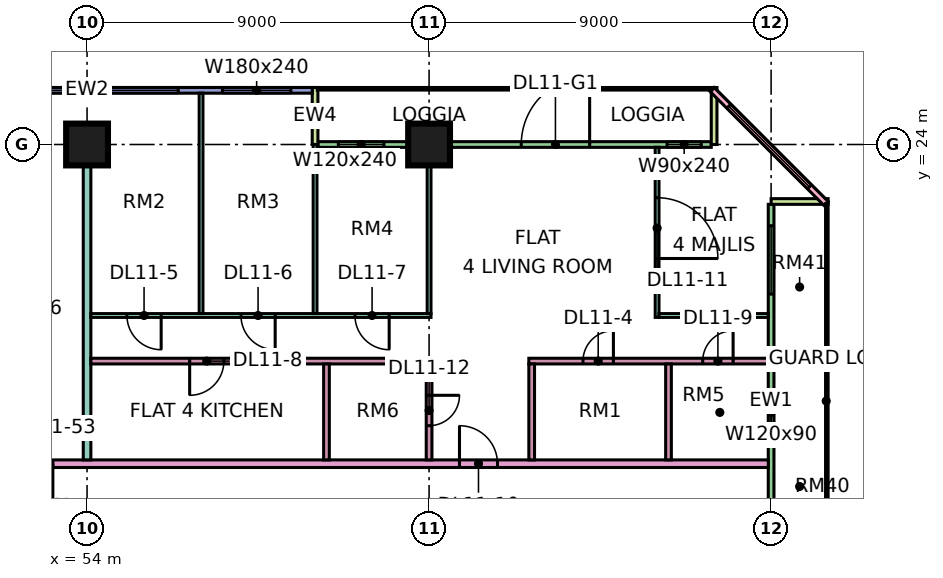
"""IFC4 building model, lengths in metres.
Left out: names, types, materials, properties, quantities, classifications, styles, units other than length and angle.
Written with IfcOpenShell. Run it as: python <this file> out.ifc"""

import sys

from ifc_helpers import new_model, si_unit, direction, frame, frame_2d, origin, origin_2d, place, context, subcontext, project, spatial, rectangle, extrude, element, fill, save


model = new_model("IFC4")
c1 = context("Model", 3, precision=1e-05, world=origin(), true_north=direction((0.0, 1.0)))
c2 = subcontext(c1, "Body", "Model", "MODEL_VIEW")
j1 = project(units=[si_unit("LENGTHUNIT", "METRE"), si_unit("PLANEANGLEUNIT", "RADIAN")], contexts=[c1])
p1 = place(None, origin())
s1 = spatial("IfcSite", under=j1, at=p1, CompositionType="ELEMENT")
p2 = place(p1, origin())
s2 = spatial("IfcBuilding", under=s1, at=p2, CompositionType="ELEMENT")
p3 = place(p2, frame((0.0, 0.0, 56.4)))
s3 = spatial("IfcBuildingStorey", under=s2, at=p3, CompositionType="ELEMENT", Elevation=56.4)
for number, where, z_axis, x_axis in (
    (1, (54.0, 24.0, 0.0), (0.0, 0.0, 1.0), (1.0, 0.0, 0.0)),
    (2, (63.0, 24.0, 0.0), (0.0, 0.0, 1.0), (1.0, 0.0, 0.0)),
):
    element("IfcColumn", number, at=place(p3, frame(where, z_axis=z_axis, x_axis=x_axis)), inside=s3, PredefinedType="COLUMN", context=c2, shape_type="SweptSolid", body=[
        extrude(rectangle(XDim=1.1, YDim=1.1, at=origin_2d()), origin(), (0.0, 0.0, 1.0), 3.75),
    ])
p4 = place(p3, frame((70.425, 24.0, 0.0), z_axis=(0.0, 0.0, 1.0), x_axis=(-1.0, 0.0, 0.0)))
e3 = element("IfcWall", 3, at=p4, inside=s3, PredefinedType="SOLIDWALL", context=c2, shape_type="SweptSolid", body=[
    extrude(rectangle(XDim=10.35, YDim=0.15, at=frame_2d((5.175, 0.0))), origin(), (0.0, 0.0, 1.0), 3.35),
])
p5 = place(p4, frame((0.262, 0.0, 0.45)))
e4 = element("IfcOpeningElement", 4, at=p5, cuts=e3, PredefinedType="OPENING", context=c2, shape_type="SweptSolid", body=[
    extrude(rectangle(XDim=0.9, YDim=2.4, at=frame_2d((0.45, 1.2))), frame((0.0, 0.085, 0.0), z_axis=(0.0, -1.0, 0.0), x_axis=(1.0, 0.0, 0.0)), (0.0, 0.0, 1.0), 0.17),
])
p6 = place(p4, frame((3.2, 0.0, 0.0)))
e5 = element("IfcOpeningElement", 5, at=p6, cuts=e3, PredefinedType="OPENING", context=c2, shape_type="SweptSolid", body=[
    extrude(rectangle(XDim=1.8, YDim=2.4, at=frame_2d((0.9, 1.2))), frame((0.0, 0.085, 0.0), z_axis=(0.0, -1.0, 0.0), x_axis=(1.0, 0.0, 0.0)), (0.0, 0.0, 1.0), 0.17),
])
p7 = place(p4, frame((8.613, 0.0, 0.45)))
e6 = element("IfcOpeningElement", 6, at=p7, cuts=e3, PredefinedType="OPENING", context=c2, shape_type="SweptSolid", body=[
    extrude(rectangle(XDim=1.2, YDim=2.4, at=frame_2d((0.6, 1.2))), frame((0.0, 0.085, 0.0), z_axis=(0.0, -1.0, 0.0), x_axis=(1.0, 0.0, 0.0)), (0.0, 0.0, 1.0), 0.17),
])
for number, where, z_axis, x_axis in (
    (7, (70.5, 25.5, 0.0), (0.0, 0.0, 1.0), (0.0, -1.0, 0.0)),
    (8, (60.0, 25.5, 0.0), (0.0, 0.0, 1.0), (0.0, -1.0, 0.0)),
):
    element("IfcWall", number, at=place(p3, frame(where, z_axis=z_axis, x_axis=x_axis)), inside=s3, PredefinedType="SOLIDWALL", context=c2, shape_type="SweptSolid", body=[
        extrude(rectangle(XDim=1.5, YDim=0.15, at=frame_2d((0.75, 0.0))), origin(), (0.0, 0.0, 1.0), 3.35),
    ])
p8 = place(p3, frame((59.925, 25.425, 0.0), z_axis=(0.0, 0.0, 1.0), x_axis=(-1.0, 0.0, 0.0)))
e9 = element("IfcWall", 9, at=p8, inside=s3, PredefinedType="SOLIDWALL", context=c2, shape_type="SweptSolid", body=[
    extrude(rectangle(XDim=11.85, YDim=0.15, at=frame_2d((5.925, 0.0))), origin(), (0.0, 0.0, 1.0), 3.35),
])
p9 = place(p8, frame((0.562, 0.0, 0.45)))
e10 = element("IfcOpeningElement", 10, at=p9, cuts=e9, PredefinedType="OPENING", context=c2, shape_type="SweptSolid", body=[
    extrude(rectangle(XDim=1.8, YDim=2.4, at=frame_2d((0.9, 1.2))), frame((0.0, 0.085, 0.0), z_axis=(0.0, -1.0, 0.0), x_axis=(1.0, 0.0, 0.0)), (0.0, 0.0, 1.0), 0.17),
])
p10 = place(p8, frame((3.525, 0.0, 0.45)))
e11 = element("IfcOpeningElement", 11, at=p10, cuts=e9, PredefinedType="OPENING", context=c2, shape_type="SweptSolid", body=[
    extrude(rectangle(XDim=1.8, YDim=2.4, at=frame_2d((0.9, 1.2))), frame((0.0, 0.085, 0.0), z_axis=(0.0, -1.0, 0.0), x_axis=(1.0, 0.0, 0.0)), (0.0, 0.0, 1.0), 0.17),
])
p11 = place(p8, frame((6.488, 0.0, 0.45)))
e12 = element("IfcOpeningElement", 12, at=p11, cuts=e9, PredefinedType="OPENING", context=c2, shape_type="SweptSolid", body=[
    extrude(rectangle(XDim=4.8, YDim=2.4, at=frame_2d((2.4, 1.2))), frame((0.0, 0.085, 0.0), z_axis=(0.0, -1.0, 0.0), x_axis=(1.0, 0.0, 0.0)), (0.0, 0.0, 1.0), 0.17),
])
p12 = place(p3, frame((72.0, 12.075, 0.0), z_axis=(0.0, 0.0, 1.0), x_axis=(0.0, 1.0, 0.0)))
e13 = element("IfcWall", 13, at=p12, inside=s3, PredefinedType="SOLIDWALL", context=c2, shape_type="SweptSolid", body=[
    extrude(rectangle(XDim=10.35, YDim=0.15, at=frame_2d((5.175, 0.0))), origin(), (0.0, 0.0, 1.0), 3.35),
])
p13 = place(p12, frame((4.275, 0.0, 1.7)))
e14 = element("IfcOpeningElement", 14, at=p13, cuts=e13, PredefinedType="OPENING", context=c2, shape_type="SweptSolid", body=[
    extrude(rectangle(XDim=1.2, YDim=0.9, at=frame_2d((0.6, 0.45))), frame((0.0, 0.085, 0.0), z_axis=(0.0, -1.0, 0.0), x_axis=(1.0, 0.0, 0.0)), (0.0, 0.0, 1.0), 0.17),
])
p14 = place(p12, frame((7.988, 0.0, 0.45)))
e15 = element("IfcOpeningElement", 15, at=p14, cuts=e13, PredefinedType="OPENING", context=c2, shape_type="SweptSolid", body=[
    extrude(rectangle(XDim=1.8, YDim=2.4, at=frame_2d((0.9, 1.2))), frame((0.0, 0.085, 0.0), z_axis=(0.0, -1.0, 0.0), x_axis=(1.0, 0.0, 0.0)), (0.0, 0.0, 1.0), 0.17),
])
p15 = place(p3, frame((73.5, 22.5, 0.0), z_axis=(0.0, 0.0, 1.0), x_axis=(-1.0, 0.0, 0.0)))
e16 = element("IfcWall", 16, at=p15, inside=s3, PredefinedType="SOLIDWALL", context=c2, shape_type="SweptSolid", body=[
    extrude(rectangle(XDim=1.5, YDim=0.15, at=frame_2d((0.75, 0.0))), origin(), (0.0, 0.0, 1.0), 3.35),
])
p16 = place(p3, frame((73.447, 22.447, 0.0), z_axis=(0.0, 0.0, 1.0), x_axis=(-0.707106781187, 0.707106781187, 0.0)))
e17 = element("IfcWall", 17, at=p16, inside=s3, PredefinedType="SOLIDWALL", context=c2, shape_type="SweptSolid", body=[
    extrude(rectangle(XDim=4.243, YDim=0.15, at=frame_2d((2.121, 0.0))), origin(), (0.0, 0.0, 1.0), 3.35),
])
p17 = place(p16, frame((0.621, 0.0, 0.45)))
e18 = element("IfcOpeningElement", 18, at=p17, cuts=e17, PredefinedType="OPENING", context=c2, shape_type="SweptSolid", body=[
    extrude(rectangle(XDim=3.0, YDim=2.4, at=frame_2d((1.5, 1.2))), frame((0.0, 0.085, 0.0), z_axis=(0.0, -1.0, 0.0), x_axis=(1.0, 0.0, 0.0)), (0.0, 0.0, 1.0), 0.17),
])
p18 = place(p3, frame((51.225, 15.6, 0.0), z_axis=(0.0, 0.0, 1.0), x_axis=(1.0, 0.0, 0.0)))
e19 = element("IfcWall", 19, at=p18, inside=s3, PredefinedType="PARTITIONING", context=c2, shape_type="SweptSolid", body=[
    extrude(rectangle(XDim=20.701, YDim=0.2, at=frame_2d((10.351, 0.0))), origin(), (0.0, 0.0, 1.0), 3.35),
])
p19 = place(p18, frame((12.575, 0.0, 0.0)))
e20 = element("IfcOpeningElement", 20, at=p19, cuts=e19, PredefinedType="OPENING", context=c2, shape_type="SweptSolid", body=[
    extrude(rectangle(XDim=1.0, YDim=2.1, at=frame_2d((0.5, 1.05))), frame((0.0, 0.11, 0.0), z_axis=(0.0, -1.0, 0.0), x_axis=(1.0, 0.0, 0.0)), (0.0, 0.0, 1.0), 0.22),
])
p20 = place(p18, frame((0.875, 0.0, 0.0)))
e21 = element("IfcOpeningElement", 21, at=p20, cuts=e19, PredefinedType="OPENING", context=c2, shape_type="SweptSolid", body=[
    extrude(rectangle(XDim=1.0, YDim=2.1, at=frame_2d((0.5, 1.05))), frame((0.0, 0.11, 0.0), z_axis=(0.0, -1.0, 0.0), x_axis=(1.0, 0.0, 0.0)), (0.0, 0.0, 1.0), 0.22),
])
p21 = place(p3, frame((54.0, 15.7, 0.0), z_axis=(0.0, 0.0, 1.0), x_axis=(0.0, 1.0, 0.0)))
e22 = element("IfcWall", 22, at=p21, inside=s3, PredefinedType="PARTITIONING", context=c2, shape_type="SweptSolid", body=[
    extrude(rectangle(XDim=8.3, YDim=0.2, at=frame_2d((4.15, 0.0))), origin(), (0.0, 0.0, 1.0), 3.35),
])
p22 = place(p3, frame((54.1, 18.3, 0.0), z_axis=(0.0, 0.0, 1.0), x_axis=(1.0, 0.0, 0.0)))
e23 = element("IfcWall", 23, at=p22, inside=s3, PredefinedType="PARTITIONING", context=c2, shape_type="SweptSolid", body=[
    extrude(rectangle(XDim=8.975, YDim=0.15, at=frame_2d((4.487, 0.0))), origin(), (0.0, 0.0, 1.0), 3.35),
])
p23 = place(p22, frame((2.6, 0.0, 0.0)))
e24 = element("IfcOpeningElement", 24, at=p23, cuts=e23, PredefinedType="OPENING", context=c2, shape_type="SweptSolid", body=[
    extrude(rectangle(XDim=0.9, YDim=2.1, at=frame_2d((0.45, 1.05))), frame((0.0, 0.085, 0.0), z_axis=(0.0, -1.0, 0.0), x_axis=(1.0, 0.0, 0.0)), (0.0, 0.0, 1.0), 0.17),
])
p24 = place(p3, frame((54.1, 19.5, 0.0), z_axis=(0.0, 0.0, 1.0), x_axis=(1.0, 0.0, 0.0)))
e25 = element("IfcWall", 25, at=p24, inside=s3, PredefinedType="PARTITIONING", context=c2, shape_type="SweptSolid", body=[
    extrude(rectangle(XDim=8.95, YDim=0.1, at=frame_2d((4.475, 0.0))), origin(), (0.0, 0.0, 1.0), 3.35),
])
p25 = place(p24, frame((0.95, 0.0, 0.0)))
e26 = element("IfcOpeningElement", 26, at=p25, cuts=e25, PredefinedType="OPENING", context=c2, shape_type="SweptSolid", body=[
    extrude(rectangle(XDim=0.9, YDim=2.1, at=frame_2d((0.45, 1.05))), frame((0.0, 0.06, 0.0), z_axis=(0.0, -1.0, 0.0), x_axis=(1.0, 0.0, 0.0)), (0.0, 0.0, 1.0), 0.12),
])
p26 = place(p24, frame((3.95, 0.0, 0.0)))
e27 = element("IfcOpeningElement", 27, at=p26, cuts=e25, PredefinedType="OPENING", context=c2, shape_type="SweptSolid", body=[
    extrude(rectangle(XDim=0.9, YDim=2.1, at=frame_2d((0.45, 1.05))), frame((0.0, 0.06, 0.0), z_axis=(0.0, -1.0, 0.0), x_axis=(1.0, 0.0, 0.0)), (0.0, 0.0, 1.0), 0.12),
])
p27 = place(p24, frame((6.95, 0.0, 0.0)))
e28 = element("IfcOpeningElement", 28, at=p27, cuts=e25, PredefinedType="OPENING", context=c2, shape_type="SweptSolid", body=[
    extrude(rectangle(XDim=0.9, YDim=2.1, at=frame_2d((0.45, 1.05))), frame((0.0, 0.06, 0.0), z_axis=(0.0, -1.0, 0.0), x_axis=(1.0, 0.0, 0.0)), (0.0, 0.0, 1.0), 0.12),
])
p28 = place(p3, frame((57.0, 19.55, 0.0), z_axis=(0.0, 0.0, 1.0), x_axis=(0.0, 1.0, 0.0)))
e29 = element("IfcWall", 29, at=p28, inside=s3, PredefinedType="PARTITIONING", context=c2, shape_type="SweptSolid", body=[
    extrude(rectangle(XDim=5.801, YDim=0.1, at=frame_2d((2.9, 0.0))), origin(), (0.0, 0.0, 1.0), 3.35),
])
p29 = place(p3, frame((60.0, 19.55, 0.0), z_axis=(0.0, 0.0, 1.0), x_axis=(0.0, 1.0, 0.0)))
e30 = element("IfcWall", 30, at=p29, inside=s3, PredefinedType="PARTITIONING", context=c2, shape_type="SweptSolid", body=[
    extrude(rectangle(XDim=4.45, YDim=0.1, at=frame_2d((2.225, 0.0))), origin(), (0.0, 0.0, 1.0), 3.35),
])
p30 = place(p3, frame((60.3, 15.7, 0.0), z_axis=(0.0, 0.0, 1.0), x_axis=(0.0, 1.0, 0.0)))
e31 = element("IfcWall", 31, at=p30, inside=s3, PredefinedType="PARTITIONING", context=c2, shape_type="SweptSolid", body=[
    extrude(rectangle(XDim=2.525, YDim=0.15, at=frame_2d((1.263, 0.0))), origin(), (0.0, 0.0, 1.0), 3.35),
])
p31 = place(p3, frame((63.0, 15.7, 0.0), z_axis=(0.0, 0.0, 1.0), x_axis=(0.0, 1.0, 0.0)))
e32 = element("IfcWall", 32, at=p31, inside=s3, PredefinedType="PARTITIONING", context=c2, shape_type="SweptSolid", body=[
    extrude(rectangle(XDim=2.525, YDim=0.15, at=frame_2d((1.263, 0.0))), origin(), (0.0, 0.0, 1.0), 3.35),
])
p32 = place(p31, frame((0.9, 0.0, 0.0)))
e33 = element("IfcOpeningElement", 33, at=p32, cuts=e32, PredefinedType="OPENING", context=c2, shape_type="SweptSolid", body=[
    extrude(rectangle(XDim=0.8, YDim=2.1, at=frame_2d((0.4, 1.05))), frame((0.0, 0.085, 0.0), z_axis=(0.0, -1.0, 0.0), x_axis=(1.0, 0.0, 0.0)), (0.0, 0.0, 1.0), 0.17),
])
p33 = place(p3, frame((63.0, 19.55, 0.0), z_axis=(0.0, 0.0, 1.0), x_axis=(0.0, 1.0, 0.0)))
e34 = element("IfcWall", 34, at=p33, inside=s3, PredefinedType="PARTITIONING", context=c2, shape_type="SweptSolid", body=[
    extrude(rectangle(XDim=4.376, YDim=0.1, at=frame_2d((2.188, 0.0))), origin(), (0.0, 0.0, 1.0), 3.35),
])
p34 = place(p3, frame((65.625, 18.3, 0.0), z_axis=(0.0, 0.0, 1.0), x_axis=(1.0, 0.0, 0.0)))
e35 = element("IfcWall", 35, at=p34, inside=s3, PredefinedType="PARTITIONING", context=c2, shape_type="SweptSolid", body=[
    extrude(rectangle(XDim=6.301, YDim=0.15, at=frame_2d((3.15, 0.0))), origin(), (0.0, 0.0, 1.0), 3.35),
])
p35 = place(p34, frame((1.425, 0.0, 0.0)))
e36 = element("IfcOpeningElement", 36, at=p35, cuts=e35, PredefinedType="OPENING", context=c2, shape_type="SweptSolid", body=[
    extrude(rectangle(XDim=0.8, YDim=2.1, at=frame_2d((0.4, 1.05))), frame((0.0, 0.085, 0.0), z_axis=(0.0, -1.0, 0.0), x_axis=(1.0, 0.0, 0.0)), (0.0, 0.0, 1.0), 0.17),
])
p36 = place(p34, frame((4.575, 0.0, 0.0)))
e37 = element("IfcOpeningElement", 37, at=p36, cuts=e35, PredefinedType="OPENING", context=c2, shape_type="SweptSolid", body=[
    extrude(rectangle(XDim=0.8, YDim=2.1, at=frame_2d((0.4, 1.05))), frame((0.0, 0.085, 0.0), z_axis=(0.0, -1.0, 0.0), x_axis=(1.0, 0.0, 0.0)), (0.0, 0.0, 1.0), 0.17),
])
p37 = place(p3, frame((65.7, 15.7, 0.0), z_axis=(0.0, 0.0, 1.0), x_axis=(0.0, 1.0, 0.0)))
e38 = element("IfcWall", 38, at=p37, inside=s3, PredefinedType="PARTITIONING", context=c2, shape_type="SweptSolid", body=[
    extrude(rectangle(XDim=2.525, YDim=0.15, at=frame_2d((1.263, 0.0))), origin(), (0.0, 0.0, 1.0), 3.35),
])
p38 = place(p3, frame((69.0, 19.45, 0.0), z_axis=(0.0, 0.0, 1.0), x_axis=(0.0, 1.0, 0.0)))
e39 = element("IfcWall", 39, at=p38, inside=s3, PredefinedType="PARTITIONING", context=c2, shape_type="SweptSolid", body=[
    extrude(rectangle(XDim=4.476, YDim=0.1, at=frame_2d((2.238, 0.0))), origin(), (0.0, 0.0, 1.0), 3.35),
])
p39 = place(p38, frame((1.55, 0.0, 0.0)))
e40 = element("IfcOpeningElement", 40, at=p39, cuts=e39, PredefinedType="OPENING", context=c2, shape_type="SweptSolid", body=[
    extrude(rectangle(XDim=1.6, YDim=2.1, at=frame_2d((0.8, 1.05))), frame((0.0, 0.06, 0.0), z_axis=(0.0, -1.0, 0.0), x_axis=(1.0, 0.0, 0.0)), (0.0, 0.0, 1.0), 0.12),
])
p40 = place(p3, frame((69.05, 19.5, 0.0), z_axis=(0.0, 0.0, 1.0), x_axis=(1.0, 0.0, 0.0)))
e41 = element("IfcWall", 41, at=p40, inside=s3, PredefinedType="PARTITIONING", context=c2, shape_type="SweptSolid", body=[
    extrude(rectangle(XDim=2.876, YDim=0.1, at=frame_2d((1.438, 0.0))), origin(), (0.0, 0.0, 1.0), 3.35),
])
p41 = place(p3, frame((69.3, 15.7, 0.0), z_axis=(0.0, 0.0, 1.0), x_axis=(0.0, 1.0, 0.0)))
e42 = element("IfcWall", 42, at=p41, inside=s3, PredefinedType="PARTITIONING", context=c2, shape_type="SweptSolid", body=[
    extrude(rectangle(XDim=2.525, YDim=0.15, at=frame_2d((1.263, 0.0))), origin(), (0.0, 0.0, 1.0), 3.35),
])
p42 = place(p5, origin())
e43 = element("IfcWindow", 43, at=p42, inside=s3, PartitioningType="SINGLE_PANEL", PredefinedType="WINDOW", context=c2, shape_type="SweptSolid", body=[
    extrude(rectangle(XDim=0.9, YDim=2.4, at=frame_2d((0.45, 1.2))), frame((0.0, 0.03, 0.0), z_axis=(0.0, -1.0, 0.0), x_axis=(1.0, 0.0, 0.0)), (0.0, 0.0, 1.0), 0.06),
])
fill(e4, e43)
p43 = place(p6, frame((1.8, 0.0, 0.0), z_axis=(0.0, 0.0, 1.0), x_axis=(-1.0, 0.0, 0.0)))
e44 = element("IfcDoor", 44, at=p43, inside=s3, OperationType="DOUBLE_DOOR_SINGLE_SWING", PredefinedType="DOOR", context=c2, shape_type="SweptSolid", body=[
    extrude(rectangle(XDim=1.8, YDim=2.4, at=frame_2d((0.9, 1.2))), frame((0.0, 0.025, 0.0), z_axis=(0.0, -1.0, 0.0), x_axis=(1.0, 0.0, 0.0)), (0.0, 0.0, 1.0), 0.05),
])
fill(e5, e44)
p44 = place(p7, origin())
e45 = element("IfcWindow", 45, at=p44, inside=s3, PartitioningType="SINGLE_PANEL", PredefinedType="WINDOW", context=c2, shape_type="SweptSolid", body=[
    extrude(rectangle(XDim=1.2, YDim=2.4, at=frame_2d((0.6, 1.2))), frame((0.0, 0.03, 0.0), z_axis=(0.0, -1.0, 0.0), x_axis=(1.0, 0.0, 0.0)), (0.0, 0.0, 1.0), 0.06),
])
fill(e6, e45)
p45 = place(p9, origin())
e46 = element("IfcWindow", 46, at=p45, inside=s3, PartitioningType="SINGLE_PANEL", PredefinedType="WINDOW", context=c2, shape_type="SweptSolid", body=[
    extrude(rectangle(XDim=1.8, YDim=2.4, at=frame_2d((0.9, 1.2))), frame((0.0, 0.03, 0.0), z_axis=(0.0, -1.0, 0.0), x_axis=(1.0, 0.0, 0.0)), (0.0, 0.0, 1.0), 0.06),
])
fill(e10, e46)
p46 = place(p10, origin())
e47 = element("IfcWindow", 47, at=p46, inside=s3, PartitioningType="SINGLE_PANEL", PredefinedType="WINDOW", context=c2, shape_type="SweptSolid", body=[
    extrude(rectangle(XDim=1.8, YDim=2.4, at=frame_2d((0.9, 1.2))), frame((0.0, 0.03, 0.0), z_axis=(0.0, -1.0, 0.0), x_axis=(1.0, 0.0, 0.0)), (0.0, 0.0, 1.0), 0.06),
])
fill(e11, e47)
p47 = place(p11, origin())
e48 = element("IfcWindow", 48, at=p47, inside=s3, PartitioningType="SINGLE_PANEL", PredefinedType="WINDOW", context=c2, shape_type="SweptSolid", body=[
    extrude(rectangle(XDim=4.8, YDim=2.4, at=frame_2d((2.4, 1.2))), frame((0.0, 0.03, 0.0), z_axis=(0.0, -1.0, 0.0), x_axis=(1.0, 0.0, 0.0)), (0.0, 0.0, 1.0), 0.06),
])
fill(e12, e48)
p48 = place(p13, origin())
e49 = element("IfcWindow", 49, at=p48, inside=s3, PartitioningType="SINGLE_PANEL", PredefinedType="WINDOW", context=c2, shape_type="SweptSolid", body=[
    extrude(rectangle(XDim=1.2, YDim=0.9, at=frame_2d((0.6, 0.45))), frame((0.0, 0.03, 0.0), z_axis=(0.0, -1.0, 0.0), x_axis=(1.0, 0.0, 0.0)), (0.0, 0.0, 1.0), 0.06),
])
fill(e14, e49)
p49 = place(p14, origin())
e50 = element("IfcWindow", 50, at=p49, inside=s3, PartitioningType="SINGLE_PANEL", PredefinedType="WINDOW", context=c2, shape_type="SweptSolid", body=[
    extrude(rectangle(XDim=1.8, YDim=2.4, at=frame_2d((0.9, 1.2))), frame((0.0, 0.03, 0.0), z_axis=(0.0, -1.0, 0.0), x_axis=(1.0, 0.0, 0.0)), (0.0, 0.0, 1.0), 0.06),
])
fill(e15, e50)
p50 = place(p17, origin())
e51 = element("IfcWindow", 51, at=p50, inside=s3, PartitioningType="SINGLE_PANEL", PredefinedType="WINDOW", context=c2, shape_type="SweptSolid", body=[
    extrude(rectangle(XDim=3.0, YDim=2.4, at=frame_2d((1.5, 1.2))), frame((0.0, 0.03, 0.0), z_axis=(0.0, -1.0, 0.0), x_axis=(1.0, 0.0, 0.0)), (0.0, 0.0, 1.0), 0.06),
])
fill(e18, e51)
p51 = place(p35, frame((0.8, 0.0, 0.0), z_axis=(0.0, 0.0, 1.0), x_axis=(-1.0, 0.0, 0.0)))
e52 = element("IfcDoor", 52, at=p51, inside=s3, OperationType="SINGLE_SWING_RIGHT", PredefinedType="DOOR", context=c2, shape_type="SweptSolid", body=[
    extrude(rectangle(XDim=0.8, YDim=2.1, at=frame_2d((0.4, 1.05))), frame((0.0, 0.025, 0.0), z_axis=(0.0, -1.0, 0.0), x_axis=(1.0, 0.0, 0.0)), (0.0, 0.0, 1.0), 0.05),
])
fill(e36, e52)
p52 = place(p25, origin())
e53 = element("IfcDoor", 53, at=p52, inside=s3, OperationType="SINGLE_SWING_RIGHT", PredefinedType="DOOR", context=c2, shape_type="SweptSolid", body=[
    extrude(rectangle(XDim=0.9, YDim=2.1, at=frame_2d((0.45, 1.05))), frame((0.0, 0.025, 0.0), z_axis=(0.0, -1.0, 0.0), x_axis=(1.0, 0.0, 0.0)), (0.0, 0.0, 1.0), 0.05),
])
fill(e26, e53)
p53 = place(p26, origin())
e54 = element("IfcDoor", 54, at=p53, inside=s3, OperationType="SINGLE_SWING_RIGHT", PredefinedType="DOOR", context=c2, shape_type="SweptSolid", body=[
    extrude(rectangle(XDim=0.9, YDim=2.1, at=frame_2d((0.45, 1.05))), frame((0.0, 0.025, 0.0), z_axis=(0.0, -1.0, 0.0), x_axis=(1.0, 0.0, 0.0)), (0.0, 0.0, 1.0), 0.05),
])
fill(e27, e54)
p54 = place(p27, origin())
e55 = element("IfcDoor", 55, at=p54, inside=s3, OperationType="SINGLE_SWING_RIGHT", PredefinedType="DOOR", context=c2, shape_type="SweptSolid", body=[
    extrude(rectangle(XDim=0.9, YDim=2.1, at=frame_2d((0.45, 1.05))), frame((0.0, 0.025, 0.0), z_axis=(0.0, -1.0, 0.0), x_axis=(1.0, 0.0, 0.0)), (0.0, 0.0, 1.0), 0.05),
])
fill(e28, e55)
p55 = place(p23, frame((0.9, 0.0, 0.0), z_axis=(0.0, 0.0, 1.0), x_axis=(-1.0, 0.0, 0.0)))
e56 = element("IfcDoor", 56, at=p55, inside=s3, OperationType="SINGLE_SWING_LEFT", PredefinedType="DOOR", context=c2, shape_type="SweptSolid", body=[
    extrude(rectangle(XDim=0.9, YDim=2.1, at=frame_2d((0.45, 1.05))), frame((0.0, 0.025, 0.0), z_axis=(0.0, -1.0, 0.0), x_axis=(1.0, 0.0, 0.0)), (0.0, 0.0, 1.0), 0.05),
])
fill(e24, e56)
p56 = place(p36, frame((0.8, 0.0, 0.0), z_axis=(0.0, 0.0, 1.0), x_axis=(-1.0, 0.0, 0.0)))
e57 = element("IfcDoor", 57, at=p56, inside=s3, OperationType="SINGLE_SWING_RIGHT", PredefinedType="DOOR", context=c2, shape_type="SweptSolid", body=[
    extrude(rectangle(XDim=0.8, YDim=2.1, at=frame_2d((0.4, 1.05))), frame((0.0, 0.025, 0.0), z_axis=(0.0, -1.0, 0.0), x_axis=(1.0, 0.0, 0.0)), (0.0, 0.0, 1.0), 0.05),
])
fill(e37, e57)
p57 = place(p19, origin())
e58 = element("IfcDoor", 58, at=p57, inside=s3, OperationType="SINGLE_SWING_LEFT", PredefinedType="DOOR", context=c2, shape_type="SweptSolid", body=[
    extrude(rectangle(XDim=1.0, YDim=2.1, at=frame_2d((0.5, 1.05))), frame((0.0, 0.025, 0.0), z_axis=(0.0, -1.0, 0.0), x_axis=(1.0, 0.0, 0.0)), (0.0, 0.0, 1.0), 0.05),
])
fill(e20, e58)
p58 = place(p39, frame((1.6, 0.0, 0.0), z_axis=(0.0, 0.0, 1.0), x_axis=(-1.0, 0.0, 0.0)))
e59 = element("IfcDoor", 59, at=p58, inside=s3, OperationType="DOUBLE_DOOR_SINGLE_SWING", PredefinedType="DOOR", context=c2, shape_type="SweptSolid", body=[
    extrude(rectangle(XDim=1.6, YDim=2.1, at=frame_2d((0.8, 1.05))), frame((0.0, 0.025, 0.0), z_axis=(0.0, -1.0, 0.0), x_axis=(1.0, 0.0, 0.0)), (0.0, 0.0, 1.0), 0.05),
])
fill(e40, e59)
p59 = place(p32, origin())
e60 = element("IfcDoor", 60, at=p59, inside=s3, OperationType="SINGLE_SWING_RIGHT", PredefinedType="DOOR", context=c2, shape_type="SweptSolid", body=[
    extrude(rectangle(XDim=0.8, YDim=2.1, at=frame_2d((0.4, 1.05))), frame((0.0, 0.025, 0.0), z_axis=(0.0, -1.0, 0.0), x_axis=(1.0, 0.0, 0.0)), (0.0, 0.0, 1.0), 0.05),
])
fill(e33, e60)
p60 = place(p20, origin())
e61 = element("IfcDoor", 61, at=p60, inside=s3, OperationType="SINGLE_SWING_RIGHT", PredefinedType="DOOR", context=c2, shape_type="SweptSolid", body=[
    extrude(rectangle(XDim=1.0, YDim=2.1, at=frame_2d((0.5, 1.05))), frame((0.0, 0.025, 0.0), z_axis=(0.0, -1.0, 0.0), x_axis=(1.0, 0.0, 0.0)), (0.0, 0.0, 1.0), 0.05),
])
fill(e21, e61)
save(model, sys.argv[1])
